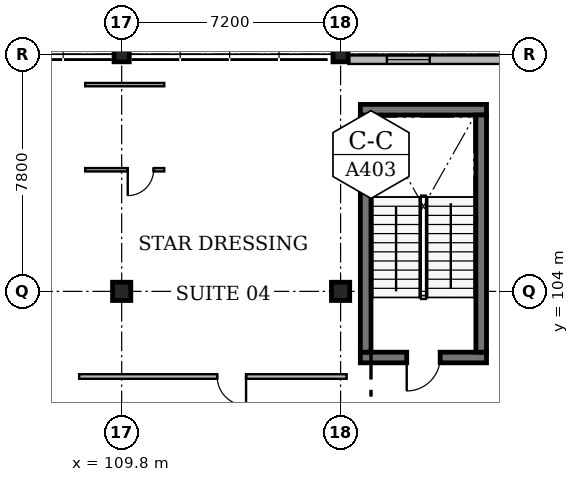
"""IFC4 building model, lengths in metres.
Left out: names, types, materials, properties, quantities, classifications, styles, units other than length and angle.
Written with IfcOpenShell. Run it as: python <this file> out.ifc"""

import sys

from ifc_helpers import new_model, si_unit, direction, frame, frame_2d, origin, origin_2d, place, context, subcontext, project, spatial, rectangle, extrude, element, fill, save


model = new_model("IFC4")
c1 = context("Model", 3, precision=1e-05, world=origin(), true_north=direction((0.0, 1.0)))
c2 = subcontext(c1, "Body", "Model", "MODEL_VIEW")
j1 = project(units=[si_unit("LENGTHUNIT", "METRE"), si_unit("PLANEANGLEUNIT", "RADIAN")], contexts=[c1])
p1 = place(None, origin())
s1 = spatial("IfcSite", under=j1, at=p1, CompositionType="ELEMENT")
p2 = place(p1, origin())
s2 = spatial("IfcBuilding", under=s1, at=p2, CompositionType="ELEMENT")
p3 = place(p2, frame((0.0, 0.0, 4.8)))
s3 = spatial("IfcBuildingStorey", under=s2, at=p3, CompositionType="ELEMENT", Elevation=4.8)
p4 = place(p3, frame((109.8, 104.0, 0.0), z_axis=(0.0, 0.0, 1.0), x_axis=(1.0, 0.0, 0.0)))
e1 = element("IfcColumn", 1, at=p4, inside=s3, PredefinedType="COLUMN", context=c2, shape_type="SweptSolid", body=[
    extrude(rectangle(XDim=0.6, YDim=0.6, at=origin_2d()), origin(), (0.0, 0.0, 1.0), 4.2),
])
p5 = place(p3, frame((109.8, 111.8, 0.0), z_axis=(0.0, 0.0, 1.0), x_axis=(1.0, 0.0, 0.0)))
e2 = element("IfcColumn", 2, at=p5, inside=s3, PredefinedType="COLUMN", context=c2, shape_type="SweptSolid", body=[
    extrude(rectangle(XDim=0.5, YDim=0.5, at=origin_2d()), origin(), (0.0, 0.0, 1.0), 4.2),
])
p6 = place(p3, frame((117.0, 104.0, 0.0), z_axis=(0.0, 0.0, 1.0), x_axis=(1.0, 0.0, 0.0)))
e3 = element("IfcColumn", 3, at=p6, inside=s3, PredefinedType="COLUMN", context=c2, shape_type="SweptSolid", body=[
    extrude(rectangle(XDim=0.6, YDim=0.6, at=origin_2d()), origin(), (0.0, 0.0, 1.0), 4.2),
])
p7 = place(p3, frame((117.0, 111.8, 0.0), z_axis=(0.0, 0.0, 1.0), x_axis=(1.0, 0.0, 0.0)))
e4 = element("IfcColumn", 4, at=p7, inside=s3, PredefinedType="COLUMN", context=c2, shape_type="SweptSolid", body=[
    extrude(rectangle(XDim=0.5, YDim=0.5, at=origin_2d()), origin(), (0.0, 0.0, 1.0), 4.2),
])
p8 = place(p3, frame((121.8, 101.825, 0.0), z_axis=(0.0, 0.0, 1.0), x_axis=(-1.0, 0.0, 0.0)))
e5 = element("IfcWall", 5, at=p8, inside=s3, PredefinedType="SOLIDWALL", context=c2, shape_type="SweptSolid", body=[
    extrude(rectangle(XDim=4.15, YDim=0.35, at=frame_2d((2.075, 0.0))), origin(), (0.0, 0.0, 1.0), 4.2),
])
p9 = place(p8, frame((1.525, 0.0, 0.0)))
e6 = element("IfcOpeningElement", 6, at=p9, cuts=e5, PredefinedType="OPENING", context=c2, shape_type="SweptSolid", body=[
    extrude(rectangle(XDim=1.1, YDim=2.15, at=frame_2d((0.55, 1.075))), frame((0.0, 0.195, 0.0), z_axis=(0.0, -1.0, 0.0), x_axis=(1.0, 0.0, 0.0)), (0.0, 0.0, 1.0), 0.39),
])
p10 = place(p3, frame((117.825, 102.0, 0.0), z_axis=(0.0, 0.0, 1.0), x_axis=(0.0, 1.0, 0.0)))
e7 = element("IfcWall", 7, at=p10, inside=s3, PredefinedType="SOLIDWALL", context=c2, shape_type="SweptSolid", body=[
    extrude(rectangle(XDim=7.8, YDim=0.35, at=frame_2d((3.9, 0.0))), origin(), (0.0, 0.0, 1.0), 4.2),
])
p11 = place(p3, frame((117.65, 109.975, 0.0), z_axis=(0.0, 0.0, 1.0), x_axis=(1.0, 0.0, 0.0)))
e8 = element("IfcWall", 8, at=p11, inside=s3, PredefinedType="SOLIDWALL", context=c2, shape_type="SweptSolid", body=[
    extrude(rectangle(XDim=4.15, YDim=0.35, at=frame_2d((2.075, 0.0))), origin(), (0.0, 0.0, 1.0), 4.2),
])
p12 = place(p3, frame((121.625, 109.8, 0.0), z_axis=(0.0, 0.0, 1.0), x_axis=(0.0, -1.0, 0.0)))
e9 = element("IfcWall", 9, at=p12, inside=s3, PredefinedType="SOLIDWALL", context=c2, shape_type="SweptSolid", body=[
    extrude(rectangle(XDim=7.8, YDim=0.35, at=frame_2d((3.9, 0.0))), origin(), (0.0, 0.0, 1.0), 4.2),
])
p13 = place(p3, frame((117.255, 111.62, 0.0), z_axis=(0.0, 0.0, 1.0), x_axis=(1.0, 0.0, 0.0)))
e10 = element("IfcWall", 10, at=p13, inside=s3, PredefinedType="SOLIDWALL", context=c2, shape_type="SweptSolid", body=[
    extrude(rectangle(XDim=7.89, YDim=0.28, at=frame_2d((3.945, 0.0))), origin(), (0.0, 0.0, 1.0), 3.273),
])
p14 = place(p13, frame((1.268, 0.0, 0.95)))
e11 = element("IfcOpeningElement", 11, at=p14, cuts=e10, PredefinedType="OPENING", context=c2, shape_type="SweptSolid", body=[
    extrude(rectangle(XDim=1.41, YDim=1.95, at=frame_2d((0.705, 0.975))), frame((0.0, 0.16, 0.0), z_axis=(0.0, -1.0, 0.0), x_axis=(1.0, 0.0, 0.0)), (0.0, 0.0, 1.0), 0.32),
])
p15 = place(p13, frame((5.212, 0.0, 0.95)))
e12 = element("IfcOpeningElement", 12, at=p15, cuts=e10, PredefinedType="OPENING", context=c2, shape_type="SweptSolid", body=[
    extrude(rectangle(XDim=1.41, YDim=1.95, at=frame_2d((0.705, 0.975))), frame((0.0, 0.16, 0.0), z_axis=(0.0, -1.0, 0.0), x_axis=(1.0, 0.0, 0.0)), (0.0, 0.0, 1.0), 0.32),
])
p16 = place(p3, frame((111.2, 108.0, 0.0), z_axis=(0.0, 0.0, 1.0), x_axis=(-1.0, 0.0, 0.0)))
e13 = element("IfcWall", 13, at=p16, inside=s3, PredefinedType="PARTITIONING", context=c2, shape_type="SweptSolid", body=[
    extrude(rectangle(XDim=2.6, YDim=0.11, at=frame_2d((1.3, 0.0))), origin(), (0.0, 0.0, 1.0), 3.94),
])
p17 = place(p16, frame((0.35, 0.0, 0.0)))
e14 = element("IfcOpeningElement", 14, at=p17, cuts=e13, PredefinedType="OPENING", context=c2, shape_type="SweptSolid", body=[
    extrude(rectangle(XDim=0.85, YDim=2.1, at=frame_2d((0.425, 1.05))), frame((0.0, 0.075, 0.0), z_axis=(0.0, -1.0, 0.0), x_axis=(1.0, 0.0, 0.0)), (0.0, 0.0, 1.0), 0.15),
])
p18 = place(p3, frame((108.6, 110.8, 0.0), z_axis=(0.0, 0.0, 1.0), x_axis=(1.0, 0.0, 0.0)))
e15 = element("IfcWall", 15, at=p18, inside=s3, PredefinedType="PARTITIONING", context=c2, shape_type="SweptSolid", body=[
    extrude(rectangle(XDim=2.6, YDim=0.11, at=frame_2d((1.3, 0.0))), origin(), (0.0, 0.0, 1.0), 3.94),
])
p19 = place(p3, frame((117.2, 101.2, 0.0), z_axis=(0.0, 0.0, 1.0), x_axis=(-1.0, 0.0, 0.0)))
e16 = element("IfcWall", 16, at=p19, inside=s3, PredefinedType="PARTITIONING", context=c2, shape_type="SweptSolid", body=[
    extrude(rectangle(XDim=8.8, YDim=0.15, at=frame_2d((4.4, 0.0))), origin(), (0.0, 0.0, 1.0), 3.94),
])
p20 = place(p19, frame((3.309, 0.0, 0.0)))
e17 = element("IfcOpeningElement", 17, at=p20, cuts=e16, PredefinedType="OPENING", context=c2, shape_type="SweptSolid", body=[
    extrude(rectangle(XDim=0.95, YDim=2.2, at=frame_2d((0.475, 1.1))), frame((0.0, 0.095, 0.0), z_axis=(0.0, -1.0, 0.0), x_axis=(1.0, 0.0, 0.0)), (0.0, 0.0, 1.0), 0.19),
])
p21 = place(p9, origin())
e18 = element("IfcDoor", 18, at=p21, inside=s3, OperationType="SINGLE_SWING_RIGHT", PredefinedType="DOOR", context=c2, shape_type="SweptSolid", body=[
    extrude(rectangle(XDim=1.1, YDim=2.15, at=frame_2d((0.55, 1.075))), frame((0.0, 0.025, 0.0), z_axis=(0.0, -1.0, 0.0), x_axis=(1.0, 0.0, 0.0)), (0.0, 0.0, 1.0), 0.05),
])
fill(e6, e18)
p22 = place(p14, origin())
e19 = element("IfcWindow", 19, at=p22, inside=s3, PartitioningType="SINGLE_PANEL", PredefinedType="WINDOW", context=c2, shape_type="SweptSolid", body=[
    extrude(rectangle(XDim=1.41, YDim=1.95, at=frame_2d((0.705, 0.975))), frame((0.0, 0.03, 0.0), z_axis=(0.0, -1.0, 0.0), x_axis=(1.0, 0.0, 0.0)), (0.0, 0.0, 1.0), 0.06),
])
fill(e11, e19)
p23 = place(p17, origin())
e20 = element("IfcDoor", 20, at=p23, inside=s3, OperationType="SINGLE_SWING_RIGHT", PredefinedType="DOOR", context=c2, shape_type="SweptSolid", body=[
    extrude(rectangle(XDim=0.85, YDim=2.1, at=frame_2d((0.425, 1.05))), frame((0.0, 0.025, 0.0), z_axis=(0.0, -1.0, 0.0), x_axis=(1.0, 0.0, 0.0)), (0.0, 0.0, 1.0), 0.05),
])
fill(e14, e20)
p24 = place(p20, origin())
e21 = element("IfcDoor", 21, at=p24, inside=s3, OperationType="SINGLE_SWING_LEFT", PredefinedType="DOOR", context=c2, shape_type="SweptSolid", body=[
    extrude(rectangle(XDim=0.95, YDim=2.2, at=frame_2d((0.475, 1.1))), frame((0.0, 0.025, 0.0), z_axis=(0.0, -1.0, 0.0), x_axis=(1.0, 0.0, 0.0)), (0.0, 0.0, 1.0), 0.05),
])
fill(e17, e21)
save(model, sys.argv[1])
